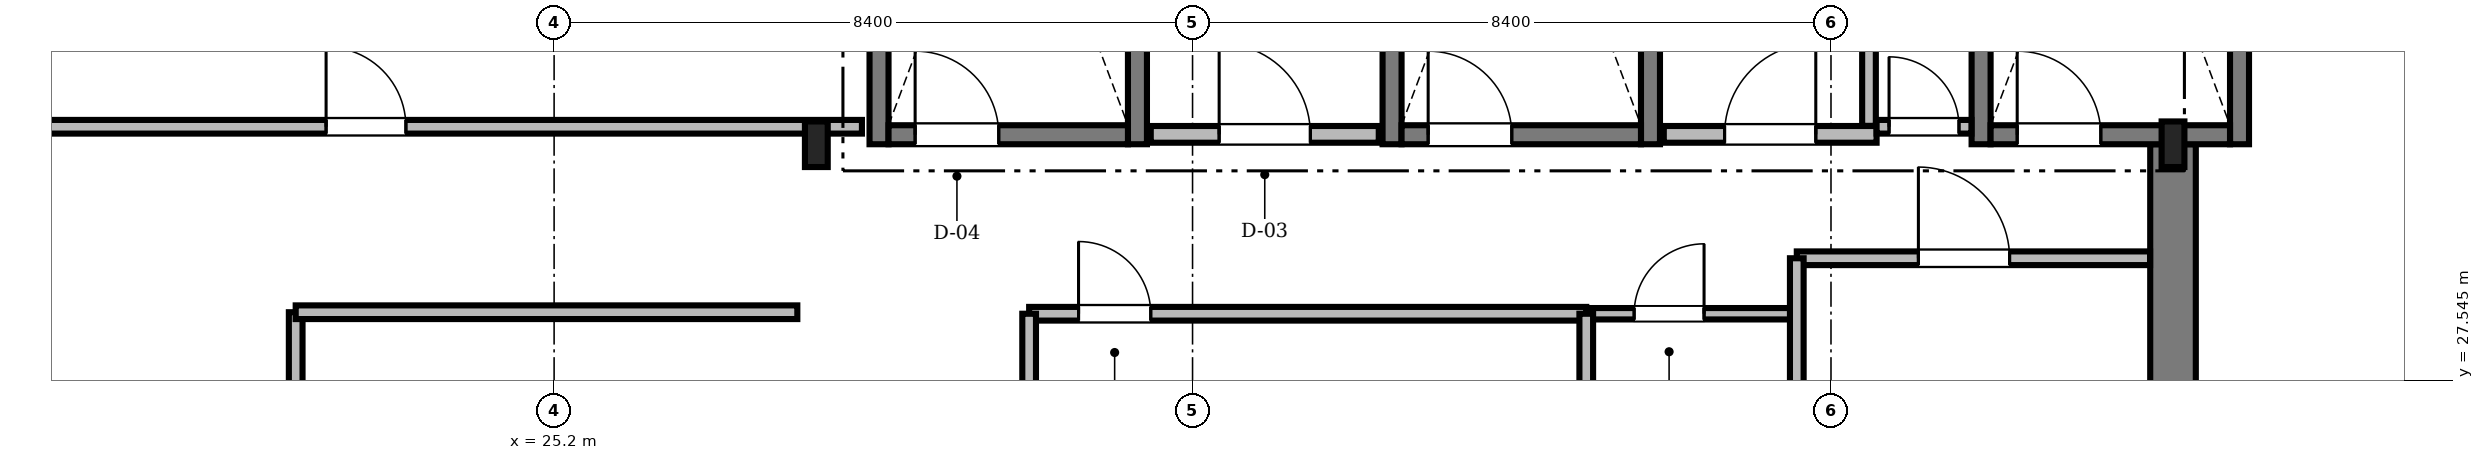
"""IFC4 building model, lengths in metres.
Left out: names, types, materials, properties, quantities, classifications, styles, units other than length and angle.
Written with IfcOpenShell. Run it as: python <this file> out.ifc"""

import sys

from ifc_helpers import new_model, si_unit, direction, frame, frame_2d, origin, origin_2d, place, context, subcontext, project, spatial, rectangle, i_section, extrude, source, transform, mapped, element, fill, save


model = new_model("IFC4")
c1 = context("Model", 3, precision=1e-05, world=origin(), true_north=direction((0.0, 1.0)))
c2 = subcontext(c1, "Body", "Model", "MODEL_VIEW")
j1 = project(units=[si_unit("LENGTHUNIT", "METRE"), si_unit("PLANEANGLEUNIT", "RADIAN")], contexts=[c1])
p1 = place(None, origin())
s1 = spatial("IfcSite", under=j1, at=p1, CompositionType="ELEMENT")
p2 = place(p1, origin())
s2 = spatial("IfcBuilding", under=s1, at=p2, CompositionType="ELEMENT")
p3 = place(p2, frame((0.0, 0.0, 258.5)))
s3 = spatial("IfcBuildingStorey", under=s2, at=p3, CompositionType="ELEMENT", Elevation=258.5)
m1 = source(origin(), c2, "Body", "SweptSolid", [
    extrude(rectangle(XDim=13.15, YDim=0.6, at=frame_2d((6.575, 0.0))), origin(), (0.0, 0.0, 1.0), 3.65),
])
p4 = place(p3, frame((46.5, 17.5, 0.0), z_axis=(0.0, 0.0, 1.0), x_axis=(0.0, 1.0, 0.0)))
e1 = element("IfcWall", 1, at=p4, inside=s3, PredefinedType="SHEAR", context=c2, shape_type="MappedRepresentation", body=[
    mapped(m1, transform((0.0, 0.0, 0.0), scale=1.0)),
])
m2 = source(origin(), c2, "Body", "SweptSolid", [
    extrude(i_section(OverallWidth=0.3, OverallDepth=0.6, WebThickness=0.015, FlangeThickness=0.03, FilletRadius=0.027, at=origin_2d()), origin(), (0.0, 0.0, 1.0), 3.65),
])
for number, where, z_axis, x_axis in (
    (2, (28.65, 30.65, 0.0), (0.0, 0.0, 1.0), (1.0, 0.0, 0.0)),
    (3, (46.5, 30.65, 0.0), (0.0, 0.0, 1.0), (1.0, 0.0, 0.0)),
):
    element("IfcColumn", number, at=place(p3, frame(where, z_axis=z_axis, x_axis=x_axis)), inside=s3, PredefinedType="COLUMN", context=c2, shape_type="MappedRepresentation", body=[
        mapped(m2, transform((0.0, 0.0, 0.0), scale=1.0)),
    ])
m3 = source(origin(), c2, "Body", "SweptSolid", [
    extrude(rectangle(XDim=9.35, YDim=0.25, at=frame_2d((4.675, 0.0))), origin(), (0.0, 0.0, 1.0), 3.75),
])
for number, where, z_axis, x_axis in (
    (4, (29.475, 30.65, 0.0), (0.0, 0.0, 1.0), (0.0, 1.0, 0.0)),
    (5, (32.875, 30.65, 0.0), (0.0, 0.0, 1.0), (0.0, 1.0, 0.0)),
):
    element("IfcWall", number, at=place(p3, frame(where, z_axis=z_axis, x_axis=x_axis)), inside=s3, PredefinedType="SOLIDWALL", context=c2, shape_type="MappedRepresentation", body=[
        mapped(m3, transform((0.0, 0.0, 0.0), scale=1.0)),
    ])
m4 = source(origin(), c2, "Body", "SweptSolid", [
    extrude(rectangle(XDim=3.15, YDim=0.25, at=frame_2d((1.575, 0.0))), origin(), (0.0, 0.0, 1.0), 3.75),
])
p5 = place(p3, frame((29.6, 30.775, 0.0), z_axis=(0.0, 0.0, 1.0), x_axis=(1.0, 0.0, 0.0)))
e6 = element("IfcWall", 6, at=p5, inside=s3, PredefinedType="SOLIDWALL", context=c2, shape_type="MappedRepresentation", body=[
    mapped(m4, transform((0.0, 0.0, 0.0), scale=1.0)),
])
m5 = source(origin(), c2, "Body", "SweptSolid", [
    extrude(rectangle(XDim=1.1, YDim=2.2, at=frame_2d((0.55, 1.1))), frame((0.0, 0.135, 0.0), z_axis=(0.0, -1.0, 0.0), x_axis=(1.0, 0.0, 0.0)), (0.0, 0.0, 1.0), 0.27),
])
p6 = place(p5, frame((0.35, 0.0, 0.0)))
e7 = element("IfcOpeningElement", 7, at=p6, cuts=e6, PredefinedType="OPENING", context=c2, shape_type="MappedRepresentation", body=[
    mapped(m5, transform((0.0, 0.0, 0.0), scale=1.0)),
])
for number, where, z_axis, x_axis in (
    (8, (36.225, 30.65, 0.0), (0.0, 0.0, 1.0), (0.0, 1.0, 0.0)),
    (9, (39.625, 30.65, 0.0), (0.0, 0.0, 1.0), (0.0, 1.0, 0.0)),
):
    element("IfcWall", number, at=place(p3, frame(where, z_axis=z_axis, x_axis=x_axis)), inside=s3, PredefinedType="SOLIDWALL", context=c2, shape_type="MappedRepresentation", body=[
        mapped(m3, transform((0.0, 0.0, 0.0), scale=1.0)),
    ])
p7 = place(p3, frame((36.35, 30.775, 0.0), z_axis=(0.0, 0.0, 1.0), x_axis=(1.0, 0.0, 0.0)))
e10 = element("IfcWall", 10, at=p7, inside=s3, PredefinedType="SOLIDWALL", context=c2, shape_type="MappedRepresentation", body=[
    mapped(m4, transform((0.0, 0.0, 0.0), scale=1.0)),
])
p8 = place(p7, frame((0.35, 0.0, 0.0)))
e11 = element("IfcOpeningElement", 11, at=p8, cuts=e10, PredefinedType="OPENING", context=c2, shape_type="MappedRepresentation", body=[
    mapped(m5, transform((0.0, 0.0, 0.0), scale=1.0)),
])
for number, where, z_axis, x_axis in (
    (12, (43.975, 30.65, 0.0), (0.0, 0.0, 1.0), (0.0, 1.0, 0.0)),
    (13, (47.375, 30.65, 0.0), (0.0, 0.0, 1.0), (0.0, 1.0, 0.0)),
):
    element("IfcWall", number, at=place(p3, frame(where, z_axis=z_axis, x_axis=x_axis)), inside=s3, PredefinedType="SOLIDWALL", context=c2, shape_type="MappedRepresentation", body=[
        mapped(m3, transform((0.0, 0.0, 0.0), scale=1.0)),
    ])
p9 = place(p3, frame((44.1, 30.775, 0.0), z_axis=(0.0, 0.0, 1.0), x_axis=(1.0, 0.0, 0.0)))
e14 = element("IfcWall", 14, at=p9, inside=s3, PredefinedType="SOLIDWALL", context=c2, shape_type="MappedRepresentation", body=[
    mapped(m4, transform((0.0, 0.0, 0.0), scale=1.0)),
])
p10 = place(p9, frame((0.35, 0.0, 0.0)))
e15 = element("IfcOpeningElement", 15, at=p10, cuts=e14, PredefinedType="OPENING", context=c2, shape_type="MappedRepresentation", body=[
    mapped(m5, transform((0.0, 0.0, 0.0), scale=1.0)),
])
m6 = source(origin(), c2, "Body", "SweptSolid", [
    extrude(rectangle(XDim=3.0, YDim=0.22, at=frame_2d((1.5, 0.0))), origin(), (0.0, 0.0, 1.0), 3.65),
])
p11 = place(p3, frame((33.05, 30.78, 0.0), z_axis=(0.0, 0.0, 1.0), x_axis=(1.0, 0.0, 0.0)))
e16 = element("IfcWall", 16, at=p11, inside=s3, PredefinedType="SOLIDWALL", context=c2, shape_type="MappedRepresentation", body=[
    mapped(m6, transform((0.0, 0.0, 0.0), scale=1.0)),
])
m7 = source(origin(), c2, "Body", "SweptSolid", [
    extrude(rectangle(XDim=1.2, YDim=2.2, at=frame_2d((0.6, 1.1))), frame((0.0, 0.12, 0.0), z_axis=(0.0, -1.0, 0.0), x_axis=(1.0, 0.0, 0.0)), (0.0, 0.0, 1.0), 0.24),
])
p12 = place(p11, frame((0.9, 0.0, 0.0)))
e17 = element("IfcOpeningElement", 17, at=p12, cuts=e16, PredefinedType="OPENING", context=c2, shape_type="MappedRepresentation", body=[
    mapped(m7, transform((0.0, 0.0, 0.0), scale=1.0)),
])
m8 = source(origin(), c2, "Body", "SweptSolid", [
    extrude(rectangle(XDim=2.8, YDim=0.22, at=frame_2d((1.4, 0.0))), origin(), (0.0, 0.0, 1.0), 3.65),
])
p13 = place(p3, frame((39.8, 30.78, 0.0), z_axis=(0.0, 0.0, 1.0), x_axis=(1.0, 0.0, 0.0)))
e18 = element("IfcWall", 18, at=p13, inside=s3, PredefinedType="SOLIDWALL", context=c2, shape_type="MappedRepresentation", body=[
    mapped(m8, transform((0.0, 0.0, 0.0), scale=1.0)),
])
p14 = place(p13, frame((0.8, 0.0, 0.0)))
e19 = element("IfcOpeningElement", 19, at=p14, cuts=e18, PredefinedType="OPENING", context=c2, shape_type="MappedRepresentation", body=[
    mapped(m7, transform((0.0, 0.0, 0.0), scale=1.0)),
])
m9 = source(origin(), c2, "Body", "SweptSolid", [
    extrude(rectangle(XDim=12.788, YDim=0.18, at=frame_2d((6.394, 0.0))), origin(), (0.0, 0.0, 1.0), 2.892),
])
p15 = place(p3, frame((16.462, 30.88, 0.0), z_axis=(0.0, 0.0, 1.0), x_axis=(1.0, 0.0, 0.0)))
e20 = element("IfcWall", 20, at=p15, inside=s3, PredefinedType="PARTITIONING", context=c2, shape_type="MappedRepresentation", body=[
    mapped(m9, transform((0.0, 0.0, 0.0), scale=1.0)),
])
m10 = source(origin(), c2, "Body", "SweptSolid", [
    extrude(rectangle(XDim=1.05, YDim=2.2, at=frame_2d((0.525, 1.1))), frame((0.0, 0.1, 0.0), z_axis=(0.0, -1.0, 0.0), x_axis=(1.0, 0.0, 0.0)), (0.0, 0.0, 1.0), 0.2),
])
p16 = place(p15, frame((5.738, 0.0, 0.0)))
e21 = element("IfcOpeningElement", 21, at=p16, cuts=e20, PredefinedType="OPENING", context=c2, shape_type="MappedRepresentation", body=[
    mapped(m10, transform((0.0, 0.0, 0.0), scale=1.0)),
])
m11 = source(origin(), c2, "Body", "SweptSolid", [
    extrude(rectangle(XDim=11.94, YDim=0.18, at=frame_2d((5.97, 0.0))), origin(), (0.0, 0.0, 1.0), 3.092),
])
p17 = place(p3, frame((21.8, 16.5, 0.0), z_axis=(0.0, 0.0, 1.0), x_axis=(0.0, 1.0, 0.0)))
e22 = element("IfcWall", 22, at=p17, inside=s3, PredefinedType="PARTITIONING", context=c2, shape_type="MappedRepresentation", body=[
    mapped(m11, transform((0.0, 0.0, 0.0), scale=1.0)),
])
p18 = place(p17, frame((4.5, 0.0, 0.0)))
e23 = element("IfcOpeningElement", 23, at=p18, cuts=e22, PredefinedType="OPENING", context=c2, shape_type="MappedRepresentation", body=[
    mapped(m10, transform((0.0, 0.0, 0.0), scale=1.0)),
])
m12 = source(origin(), c2, "Body", "SweptSolid", [
    extrude(rectangle(XDim=7.33, YDim=0.18, at=frame_2d((3.665, 0.0))), origin(), (0.0, 0.0, 1.0), 3.282),
])
p19 = place(p3, frame((31.45, 28.42, 0.0), z_axis=(0.0, 0.0, 1.0), x_axis=(1.0, 0.0, 0.0)))
e24 = element("IfcWall", 24, at=p19, inside=s3, PredefinedType="PARTITIONING", context=c2, shape_type="MappedRepresentation", body=[
    mapped(m12, transform((0.0, 0.0, 0.0), scale=1.0)),
])
m13 = source(origin(), c2, "Body", "SweptSolid", [
    extrude(rectangle(XDim=0.95, YDim=2.15, at=frame_2d((0.475, 1.075))), frame((0.0, 0.1, 0.0), z_axis=(0.0, -1.0, 0.0), x_axis=(1.0, 0.0, 0.0)), (0.0, 0.0, 1.0), 0.2),
])
p20 = place(p19, frame((0.65, 0.0, 0.0)))
e25 = element("IfcOpeningElement", 25, at=p20, cuts=e24, PredefinedType="OPENING", context=c2, shape_type="MappedRepresentation", body=[
    mapped(m13, transform((0.0, 0.0, 0.0), scale=1.0)),
])
m14 = source(origin(), c2, "Body", "SweptSolid", [
    extrude(rectangle(XDim=4.648, YDim=0.18, at=frame_2d((2.324, 0.0))), origin(), (0.0, 0.0, 1.0), 3.282),
])
p21 = place(p3, frame((41.55, 29.15, 0.0), z_axis=(0.0, 0.0, 1.0), x_axis=(1.0, 0.0, 0.0)))
e26 = element("IfcWall", 26, at=p21, inside=s3, PredefinedType="PARTITIONING", context=c2, shape_type="MappedRepresentation", body=[
    mapped(m14, transform((0.0, 0.0, 0.0), scale=1.0)),
])
m15 = source(origin(), c2, "Body", "SweptSolid", [
    extrude(rectangle(XDim=1.2, YDim=2.2, at=frame_2d((0.6, 1.1))), frame((0.0, 0.1, 0.0), z_axis=(0.0, -1.0, 0.0), x_axis=(1.0, 0.0, 0.0)), (0.0, 0.0, 1.0), 0.2),
])
p22 = place(p21, frame((1.6, 0.0, 0.0)))
e27 = element("IfcOpeningElement", 27, at=p22, cuts=e26, PredefinedType="OPENING", context=c2, shape_type="MappedRepresentation", body=[
    mapped(m15, transform((0.0, 0.0, 0.0), scale=1.0)),
])
m16 = source(origin(), c2, "Body", "SweptSolid", [
    extrude(rectangle(XDim=2.74, YDim=0.15, at=frame_2d((1.37, 0.0))), origin(), (0.0, 0.0, 1.0), 3.65),
])
p23 = place(p3, frame((38.78, 28.42, 0.0), z_axis=(0.0, 0.0, 1.0), x_axis=(1.0, 0.0, 0.0)))
e28 = element("IfcWall", 28, at=p23, inside=s3, PredefinedType="PARTITIONING", context=c2, shape_type="MappedRepresentation", body=[
    mapped(m16, transform((0.0, 0.0, 0.0), scale=1.0)),
])
m17 = source(origin(), c2, "Body", "SweptSolid", [
    extrude(rectangle(XDim=0.92, YDim=2.1, at=frame_2d((0.46, 1.05))), frame((0.0, 0.085, 0.0), z_axis=(0.0, -1.0, 0.0), x_axis=(1.0, 0.0, 0.0)), (0.0, 0.0, 1.0), 0.17),
])
p24 = place(p23, frame((0.63, 0.0, 0.0)))
e29 = element("IfcOpeningElement", 29, at=p24, cuts=e28, PredefinedType="OPENING", context=c2, shape_type="MappedRepresentation", body=[
    mapped(m17, transform((0.0, 0.0, 0.0), scale=1.0)),
])
m18 = source(origin(), c2, "Body", "SweptSolid", [
    extrude(rectangle(XDim=1.248, YDim=0.18, at=frame_2d((0.624, 0.0))), origin(), (0.0, 0.0, 1.0), 3.65),
])
p25 = place(p3, frame((42.6, 30.88, 0.0), z_axis=(0.0, 0.0, 1.0), x_axis=(1.0, 0.0, 0.0)))
e30 = element("IfcWall", 30, at=p25, inside=s3, PredefinedType="PARTITIONING", context=c2, shape_type="MappedRepresentation", body=[
    mapped(m18, transform((0.0, 0.0, 0.0), scale=1.0)),
])
m19 = source(origin(), c2, "Body", "SweptSolid", [
    extrude(rectangle(XDim=0.92, YDim=2.1, at=frame_2d((0.46, 1.05))), frame((0.0, 0.1, 0.0), z_axis=(0.0, -1.0, 0.0), x_axis=(1.0, 0.0, 0.0)), (0.0, 0.0, 1.0), 0.2),
])
p26 = place(p25, frame((0.164, 0.0, 0.0)))
e31 = element("IfcOpeningElement", 31, at=p26, cuts=e30, PredefinedType="OPENING", context=c2, shape_type="MappedRepresentation", body=[
    mapped(m19, transform((0.0, 0.0, 0.0), scale=1.0)),
])
m20 = source(origin(), c2, "Body", "SweptSolid", [
    extrude(rectangle(XDim=6.6, YDim=0.18, at=frame_2d((3.3, 0.0))), origin(), (0.0, 0.0, 1.0), 3.092),
])
p27 = place(p3, frame((21.8, 28.44, 0.0), z_axis=(0.0, 0.0, 1.0), x_axis=(1.0, 0.0, 0.0)))
e32 = element("IfcWall", 32, at=p27, inside=s3, PredefinedType="PARTITIONING", context=c2, shape_type="MappedRepresentation", body=[
    mapped(m20, transform((0.0, 0.0, 0.0), scale=1.0)),
])
m21 = source(origin(), c2, "Body", "SweptSolid", [
    extrude(rectangle(XDim=2.758, YDim=0.18, at=frame_2d((1.379, 0.0))), origin(), (0.0, 0.0, 1.0), 3.65),
])
p28 = place(p3, frame((42.5, 30.892, 0.0), z_axis=(0.0, 0.0, 1.0), x_axis=(0.0, 1.0, 0.0)))
e33 = element("IfcWall", 33, at=p28, inside=s3, PredefinedType="PARTITIONING", context=c2, shape_type="MappedRepresentation", body=[
    mapped(m21, transform((0.0, 0.0, 0.0), scale=1.0)),
])
m22 = source(origin(), c2, "Body", "SweptSolid", [
    extrude(rectangle(XDim=2.35, YDim=0.18, at=frame_2d((1.175, 0.0))), origin(), (0.0, 0.0, 1.0), 3.282),
])
p29 = place(p3, frame((41.55, 26.8, 0.0), z_axis=(0.0, 0.0, 1.0), x_axis=(0.0, 1.0, 0.0)))
e34 = element("IfcWall", 34, at=p29, inside=s3, PredefinedType="PARTITIONING", context=c2, shape_type="MappedRepresentation", body=[
    mapped(m22, transform((0.0, 0.0, 0.0), scale=1.0)),
])
m23 = source(origin(), c2, "Body", "SweptSolid", [
    extrude(rectangle(XDim=1.6, YDim=0.18, at=frame_2d((0.8, 0.0))), origin(), (0.0, 0.0, 1.0), 3.192),
])
for number, where, z_axis, x_axis in (
    (35, (31.45, 26.82, 0.0), (0.0, 0.0, 1.0), (0.0, 1.0, 0.0)),
    (36, (38.78, 26.82, 0.0), (0.0, 0.0, 1.0), (0.0, 1.0, 0.0)),
):
    element("IfcWall", number, at=place(p3, frame(where, z_axis=z_axis, x_axis=x_axis)), inside=s3, PredefinedType="PARTITIONING", context=c2, shape_type="MappedRepresentation", body=[
        mapped(m23, transform((0.0, 0.0, 0.0), scale=1.0)),
    ])
m24 = source(origin(), c2, "Body", "SweptSolid", [
    extrude(rectangle(XDim=1.1, YDim=2.2, at=frame_2d((0.55, 1.1))), frame((0.0, 0.025, 0.0), z_axis=(0.0, -1.0, 0.0), x_axis=(1.0, 0.0, 0.0)), (0.0, 0.0, 1.0), 0.05),
])
p30 = place(p6, origin())
e37 = element("IfcDoor", 37, at=p30, inside=s3, OperationType="SINGLE_SWING_LEFT", PredefinedType="DOOR", context=c2, shape_type="MappedRepresentation", body=[
    mapped(m24, transform((0.0, 0.0, 0.0), scale=1.0)),
])
fill(e7, e37)
p31 = place(p8, origin())
e38 = element("IfcDoor", 38, at=p31, inside=s3, OperationType="SINGLE_SWING_LEFT", PredefinedType="DOOR", context=c2, shape_type="MappedRepresentation", body=[
    mapped(m24, transform((0.0, 0.0, 0.0), scale=1.0)),
])
fill(e11, e38)
p32 = place(p10, origin())
e39 = element("IfcDoor", 39, at=p32, inside=s3, OperationType="SINGLE_SWING_LEFT", PredefinedType="DOOR", context=c2, shape_type="MappedRepresentation", body=[
    mapped(m24, transform((0.0, 0.0, 0.0), scale=1.0)),
])
fill(e15, e39)
m25 = source(origin(), c2, "Body", "SweptSolid", [
    extrude(rectangle(XDim=1.2, YDim=2.2, at=frame_2d((0.6, 1.1))), frame((0.0, 0.025, 0.0), z_axis=(0.0, -1.0, 0.0), x_axis=(1.0, 0.0, 0.0)), (0.0, 0.0, 1.0), 0.05),
])
p33 = place(p12, origin())
e40 = element("IfcDoor", 40, at=p33, inside=s3, OperationType="SINGLE_SWING_LEFT", PredefinedType="DOOR", context=c2, shape_type="MappedRepresentation", body=[
    mapped(m25, transform((0.0, 0.0, 0.0), scale=1.0)),
])
fill(e17, e40)
p34 = place(p14, origin())
e41 = element("IfcDoor", 41, at=p34, inside=s3, OperationType="SINGLE_SWING_RIGHT", PredefinedType="DOOR", context=c2, shape_type="MappedRepresentation", body=[
    mapped(m25, transform((0.0, 0.0, 0.0), scale=1.0)),
])
fill(e19, e41)
m26 = source(origin(), c2, "Body", "SweptSolid", [
    extrude(rectangle(XDim=1.05, YDim=2.2, at=frame_2d((0.525, 1.1))), frame((0.0, 0.025, 0.0), z_axis=(0.0, -1.0, 0.0), x_axis=(1.0, 0.0, 0.0)), (0.0, 0.0, 1.0), 0.05),
])
p35 = place(p16, origin())
e42 = element("IfcDoor", 42, at=p35, inside=s3, OperationType="SINGLE_SWING_LEFT", PredefinedType="DOOR", context=c2, shape_type="MappedRepresentation", body=[
    mapped(m26, transform((0.0, 0.0, 0.0), scale=1.0)),
])
fill(e21, e42)
m27 = source(origin(), c2, "Body", "SweptSolid", [
    extrude(rectangle(XDim=0.95, YDim=2.15, at=frame_2d((0.475, 1.075))), frame((0.0, 0.025, 0.0), z_axis=(0.0, -1.0, 0.0), x_axis=(1.0, 0.0, 0.0)), (0.0, 0.0, 1.0), 0.05),
])
p36 = place(p20, origin())
e43 = element("IfcDoor", 43, at=p36, inside=s3, OperationType="SINGLE_SWING_LEFT", PredefinedType="DOOR", context=c2, shape_type="MappedRepresentation", body=[
    mapped(m27, transform((0.0, 0.0, 0.0), scale=1.0)),
])
fill(e25, e43)
p37 = place(p22, origin())
e44 = element("IfcDoor", 44, at=p37, inside=s3, OperationType="SINGLE_SWING_LEFT", PredefinedType="DOOR", context=c2, shape_type="MappedRepresentation", body=[
    mapped(m25, transform((0.0, 0.0, 0.0), scale=1.0)),
])
fill(e27, e44)
m28 = source(origin(), c2, "Body", "SweptSolid", [
    extrude(rectangle(XDim=0.92, YDim=2.1, at=frame_2d((0.46, 1.05))), frame((0.0, 0.025, 0.0), z_axis=(0.0, -1.0, 0.0), x_axis=(1.0, 0.0, 0.0)), (0.0, 0.0, 1.0), 0.05),
])
p38 = place(p24, origin())
e45 = element("IfcDoor", 45, at=p38, inside=s3, OperationType="SINGLE_SWING_RIGHT", PredefinedType="DOOR", context=c2, shape_type="MappedRepresentation", body=[
    mapped(m28, transform((0.0, 0.0, 0.0), scale=1.0)),
])
fill(e29, e45)
p39 = place(p26, origin())
e46 = element("IfcDoor", 46, at=p39, inside=s3, OperationType="SINGLE_SWING_LEFT", PredefinedType="DOOR", context=c2, shape_type="MappedRepresentation", body=[
    mapped(m28, transform((0.0, 0.0, 0.0), scale=1.0)),
])
fill(e31, e46)
save(model, sys.argv[1])
